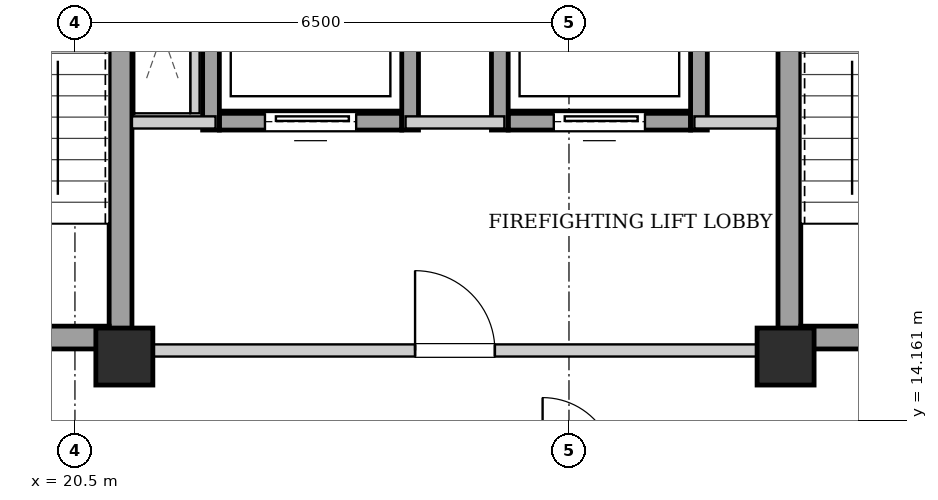
"""IFC4 building model, lengths in metres.
Left out: names, types, materials, properties, quantities, classifications, styles, units other than length and angle.
Written with IfcOpenShell. Run it as: python <this file> out.ifc"""

import sys

from ifc_helpers import new_model, si_unit, direction, frame, frame_2d, origin, origin_2d, place, context, subcontext, project, spatial, rectangle, extrude, element, fill, save


model = new_model("IFC4")
c1 = context("Model", 3, precision=1e-05, world=origin(), true_north=direction((0.0, 1.0)))
c2 = subcontext(c1, "Body", "Model", "MODEL_VIEW")
j1 = project(units=[si_unit("LENGTHUNIT", "METRE"), si_unit("PLANEANGLEUNIT", "RADIAN")], contexts=[c1])
p1 = place(None, origin())
s1 = spatial("IfcSite", under=j1, at=p1, CompositionType="ELEMENT")
p2 = place(p1, origin())
s2 = spatial("IfcBuilding", under=s1, at=p2, CompositionType="ELEMENT")
p3 = place(p2, frame((0.0, 0.0, 251.3)))
s3 = spatial("IfcBuildingStorey", under=s2, at=p3, CompositionType="ELEMENT", Elevation=251.3)
for number, where, z_axis, x_axis in (
    (1, (21.15, 15.0, 0.0), (0.0, 0.0, 1.0), (1.0, 0.0, 0.0)),
    (2, (29.85, 15.0, 0.0), (0.0, 0.0, 1.0), (1.0, 0.0, 0.0)),
):
    element("IfcColumn", number, at=place(p3, frame(where, z_axis=z_axis, x_axis=x_axis)), inside=s3, PredefinedType="COLUMN", context=c2, shape_type="SweptSolid", body=[
        extrude(rectangle(XDim=0.75, YDim=0.75, at=origin_2d()), origin(), (0.0, 0.0, 1.0), 3.4),
    ])
p4 = place(p3, frame((21.1, 15.1, 0.0), z_axis=(0.0, 0.0, 1.0), x_axis=(0.0, 1.0, 0.0)))
e3 = element("IfcWall", 3, at=p4, inside=s3, PredefinedType="SHEAR", context=c2, shape_type="SweptSolid", body=[
    extrude(rectangle(XDim=9.0, YDim=0.3, at=frame_2d((4.5, 0.0))), origin(), (0.0, 0.0, 1.0), 3.14),
])
p5 = place(p3, frame((18.1, 15.25, 0.0), z_axis=(0.0, 0.0, 1.0), x_axis=(1.0, 0.0, 0.0)))
e4 = element("IfcWall", 4, at=p5, inside=s3, PredefinedType="SHEAR", context=c2, shape_type="SweptSolid", body=[
    extrude(rectangle(XDim=2.85, YDim=0.3, at=frame_2d((1.425, 0.0))), origin(), (0.0, 0.0, 1.0), 3.14),
])
p6 = place(p5, frame((0.86, 0.0, 0.0)))
e5 = element("IfcOpeningElement", 5, at=p6, cuts=e4, PredefinedType="OPENING", context=c2, shape_type="SweptSolid", body=[
    extrude(rectangle(XDim=1.1, YDim=2.05, at=frame_2d((0.55, 1.025))), frame((0.0, 0.16, 0.0), z_axis=(0.0, -1.0, 0.0), x_axis=(1.0, 0.0, 0.0)), (0.0, 0.0, 1.0), 0.32),
])
p7 = place(p3, frame((29.9, 15.1, 0.0), z_axis=(0.0, 0.0, 1.0), x_axis=(0.0, 1.0, 0.0)))
e6 = element("IfcWall", 6, at=p7, inside=s3, PredefinedType="SHEAR", context=c2, shape_type="SweptSolid", body=[
    extrude(rectangle(XDim=9.0, YDim=0.3, at=frame_2d((4.5, 0.0))), origin(), (0.0, 0.0, 1.0), 3.14),
])
p8 = place(p3, frame((30.05, 15.25, 0.0), z_axis=(0.0, 0.0, 1.0), x_axis=(1.0, 0.0, 0.0)))
e7 = element("IfcWall", 7, at=p8, inside=s3, PredefinedType="SHEAR", context=c2, shape_type="SweptSolid", body=[
    extrude(rectangle(XDim=2.85, YDim=0.3, at=frame_2d((1.425, 0.0))), origin(), (0.0, 0.0, 1.0), 3.14),
])
p9 = place(p8, frame((0.86, 0.0, 0.0)))
e8 = element("IfcOpeningElement", 8, at=p9, cuts=e7, PredefinedType="OPENING", context=c2, shape_type="SweptSolid", body=[
    extrude(rectangle(XDim=1.1, YDim=2.05, at=frame_2d((0.55, 1.025))), frame((0.0, 0.16, 0.0), z_axis=(0.0, -1.0, 0.0), x_axis=(1.0, 0.0, 0.0)), (0.0, 0.0, 1.0), 0.32),
])
p10 = place(p3, frame((22.4, 18.09, 0.0), z_axis=(0.0, 0.0, 1.0), x_axis=(1.0, 0.0, 0.0)))
e9 = element("IfcWall", 9, at=p10, inside=s3, PredefinedType="SHEAR", context=c2, shape_type="SweptSolid", body=[
    extrude(rectangle(XDim=2.4, YDim=0.22, at=frame_2d((1.2, 0.0))), origin(), (0.0, 0.0, 1.0), 3.14),
])
p11 = place(p10, frame((0.6, 0.0, 0.0)))
e10 = element("IfcOpeningElement", 10, at=p11, cuts=e9, PredefinedType="OPENING", context=c2, shape_type="SweptSolid", body=[
    extrude(rectangle(XDim=1.2, YDim=2.15, at=frame_2d((0.6, 1.075))), frame((0.0, 0.12, 0.0), z_axis=(0.0, -1.0, 0.0), x_axis=(1.0, 0.0, 0.0)), (0.0, 0.0, 1.0), 0.24),
])
for number, where, z_axis, x_axis in (
    (11, (22.29, 17.98, 0.0), (0.0, 0.0, 1.0), (0.0, 1.0, 0.0)),
    (12, (24.91, 17.98, 0.0), (0.0, 0.0, 1.0), (0.0, 1.0, 0.0)),
):
    element("IfcWall", number, at=place(p3, frame(where, z_axis=z_axis, x_axis=x_axis)), inside=s3, PredefinedType="SHEAR", context=c2, shape_type="SweptSolid", body=[
        extrude(rectangle(XDim=2.54, YDim=0.22, at=frame_2d((1.27, 0.0))), origin(), (0.0, 0.0, 1.0), 3.14),
    ])
p12 = place(p3, frame((26.2, 18.09, 0.0), z_axis=(0.0, 0.0, 1.0), x_axis=(1.0, 0.0, 0.0)))
e13 = element("IfcWall", 13, at=p12, inside=s3, PredefinedType="SHEAR", context=c2, shape_type="SweptSolid", body=[
    extrude(rectangle(XDim=2.4, YDim=0.22, at=frame_2d((1.2, 0.0))), origin(), (0.0, 0.0, 1.0), 3.14),
])
p13 = place(p12, frame((0.6, 0.0, 0.0)))
e14 = element("IfcOpeningElement", 14, at=p13, cuts=e13, PredefinedType="OPENING", context=c2, shape_type="SweptSolid", body=[
    extrude(rectangle(XDim=1.2, YDim=2.15, at=frame_2d((0.6, 1.075))), frame((0.0, 0.12, 0.0), z_axis=(0.0, -1.0, 0.0), x_axis=(1.0, 0.0, 0.0)), (0.0, 0.0, 1.0), 0.24),
])
for number, where, z_axis, x_axis in (
    (15, (26.09, 17.98, 0.0), (0.0, 0.0, 1.0), (0.0, 1.0, 0.0)),
    (16, (28.71, 17.98, 0.0), (0.0, 0.0, 1.0), (0.0, 1.0, 0.0)),
):
    element("IfcWall", number, at=place(p3, frame(where, z_axis=z_axis, x_axis=x_axis)), inside=s3, PredefinedType="SHEAR", context=c2, shape_type="SweptSolid", body=[
        extrude(rectangle(XDim=2.54, YDim=0.22, at=frame_2d((1.27, 0.0))), origin(), (0.0, 0.0, 1.0), 3.14),
    ])
p14 = place(p3, frame((21.25, 15.08, 0.0), z_axis=(0.0, 0.0, 1.0), x_axis=(1.0, 0.0, 0.0)))
e17 = element("IfcWall", 17, at=p14, inside=s3, PredefinedType="PARTITIONING", context=c2, shape_type="SweptSolid", body=[
    extrude(rectangle(XDim=8.5, YDim=0.16, at=frame_2d((4.25, 0.0))), origin(), (0.0, 0.0, 1.0), 2.668),
])
p15 = place(p14, frame((3.725, 0.0, 0.0)))
e18 = element("IfcOpeningElement", 18, at=p15, cuts=e17, PredefinedType="OPENING", context=c2, shape_type="SweptSolid", body=[
    extrude(rectangle(XDim=1.05, YDim=2.05, at=frame_2d((0.525, 1.025))), frame((0.0, 0.09, 0.0), z_axis=(0.0, -1.0, 0.0), x_axis=(1.0, 0.0, 0.0)), (0.0, 0.0, 1.0), 0.18),
])
p16 = place(p3, frame((21.25, 18.08, 0.0), z_axis=(0.0, 0.0, 1.0), x_axis=(1.0, 0.0, 0.0)))
e19 = element("IfcWall", 19, at=p16, inside=s3, PredefinedType="PARTITIONING", context=c2, shape_type="SweptSolid", body=[
    extrude(rectangle(XDim=1.1, YDim=0.16, at=frame_2d((0.55, 0.0))), origin(), (0.0, 0.0, 1.0), 3.14),
])
p17 = place(p3, frame((24.85, 18.08, 0.0), z_axis=(0.0, 0.0, 1.0), x_axis=(1.0, 0.0, 0.0)))
e20 = element("IfcWall", 20, at=p17, inside=s3, PredefinedType="PARTITIONING", context=c2, shape_type="SweptSolid", body=[
    extrude(rectangle(XDim=1.3, YDim=0.16, at=frame_2d((0.65, 0.0))), origin(), (0.0, 0.0, 1.0), 3.14),
])
p18 = place(p3, frame((28.65, 18.08, 0.0), z_axis=(0.0, 0.0, 1.0), x_axis=(1.0, 0.0, 0.0)))
e21 = element("IfcWall", 21, at=p18, inside=s3, PredefinedType="PARTITIONING", context=c2, shape_type="SweptSolid", body=[
    extrude(rectangle(XDim=1.1, YDim=0.16, at=frame_2d((0.55, 0.0))), origin(), (0.0, 0.0, 1.0), 3.14),
])
p19 = place(p3, frame((22.08, 18.2, 0.0), z_axis=(0.0, 0.0, 1.0), x_axis=(0.0, 1.0, 0.0)))
e22 = element("IfcWall", 22, at=p19, inside=s3, PredefinedType="PARTITIONING", context=c2, shape_type="SweptSolid", body=[
    extrude(rectangle(XDim=2.12, YDim=0.12, at=frame_2d((1.06, 0.0))), origin(), (0.0, 0.0, 1.0), 3.14),
])
p20 = place(p11, origin())
e23 = element("IfcDoor", 23, at=p20, inside=s3, OperationType="SLIDING_TO_LEFT", PredefinedType="DOOR", context=c2, shape_type="SweptSolid", body=[
    extrude(rectangle(XDim=1.2, YDim=2.15, at=frame_2d((0.6, 1.075))), frame((0.0, 0.025, 0.0), z_axis=(0.0, -1.0, 0.0), x_axis=(1.0, 0.0, 0.0)), (0.0, 0.0, 1.0), 0.05),
])
fill(e10, e23)
p21 = place(p13, origin())
e24 = element("IfcDoor", 24, at=p21, inside=s3, OperationType="SLIDING_TO_LEFT", PredefinedType="DOOR", context=c2, shape_type="SweptSolid", body=[
    extrude(rectangle(XDim=1.2, YDim=2.15, at=frame_2d((0.6, 1.075))), frame((0.0, 0.025, 0.0), z_axis=(0.0, -1.0, 0.0), x_axis=(1.0, 0.0, 0.0)), (0.0, 0.0, 1.0), 0.05),
])
fill(e14, e24)
p22 = place(p15, origin())
e25 = element("IfcDoor", 25, at=p22, inside=s3, OperationType="SINGLE_SWING_LEFT", PredefinedType="DOOR", context=c2, shape_type="SweptSolid", body=[
    extrude(rectangle(XDim=1.05, YDim=2.05, at=frame_2d((0.525, 1.025))), frame((0.0, 0.025, 0.0), z_axis=(0.0, -1.0, 0.0), x_axis=(1.0, 0.0, 0.0)), (0.0, 0.0, 1.0), 0.05),
])
fill(e18, e25)
save(model, sys.argv[1])
